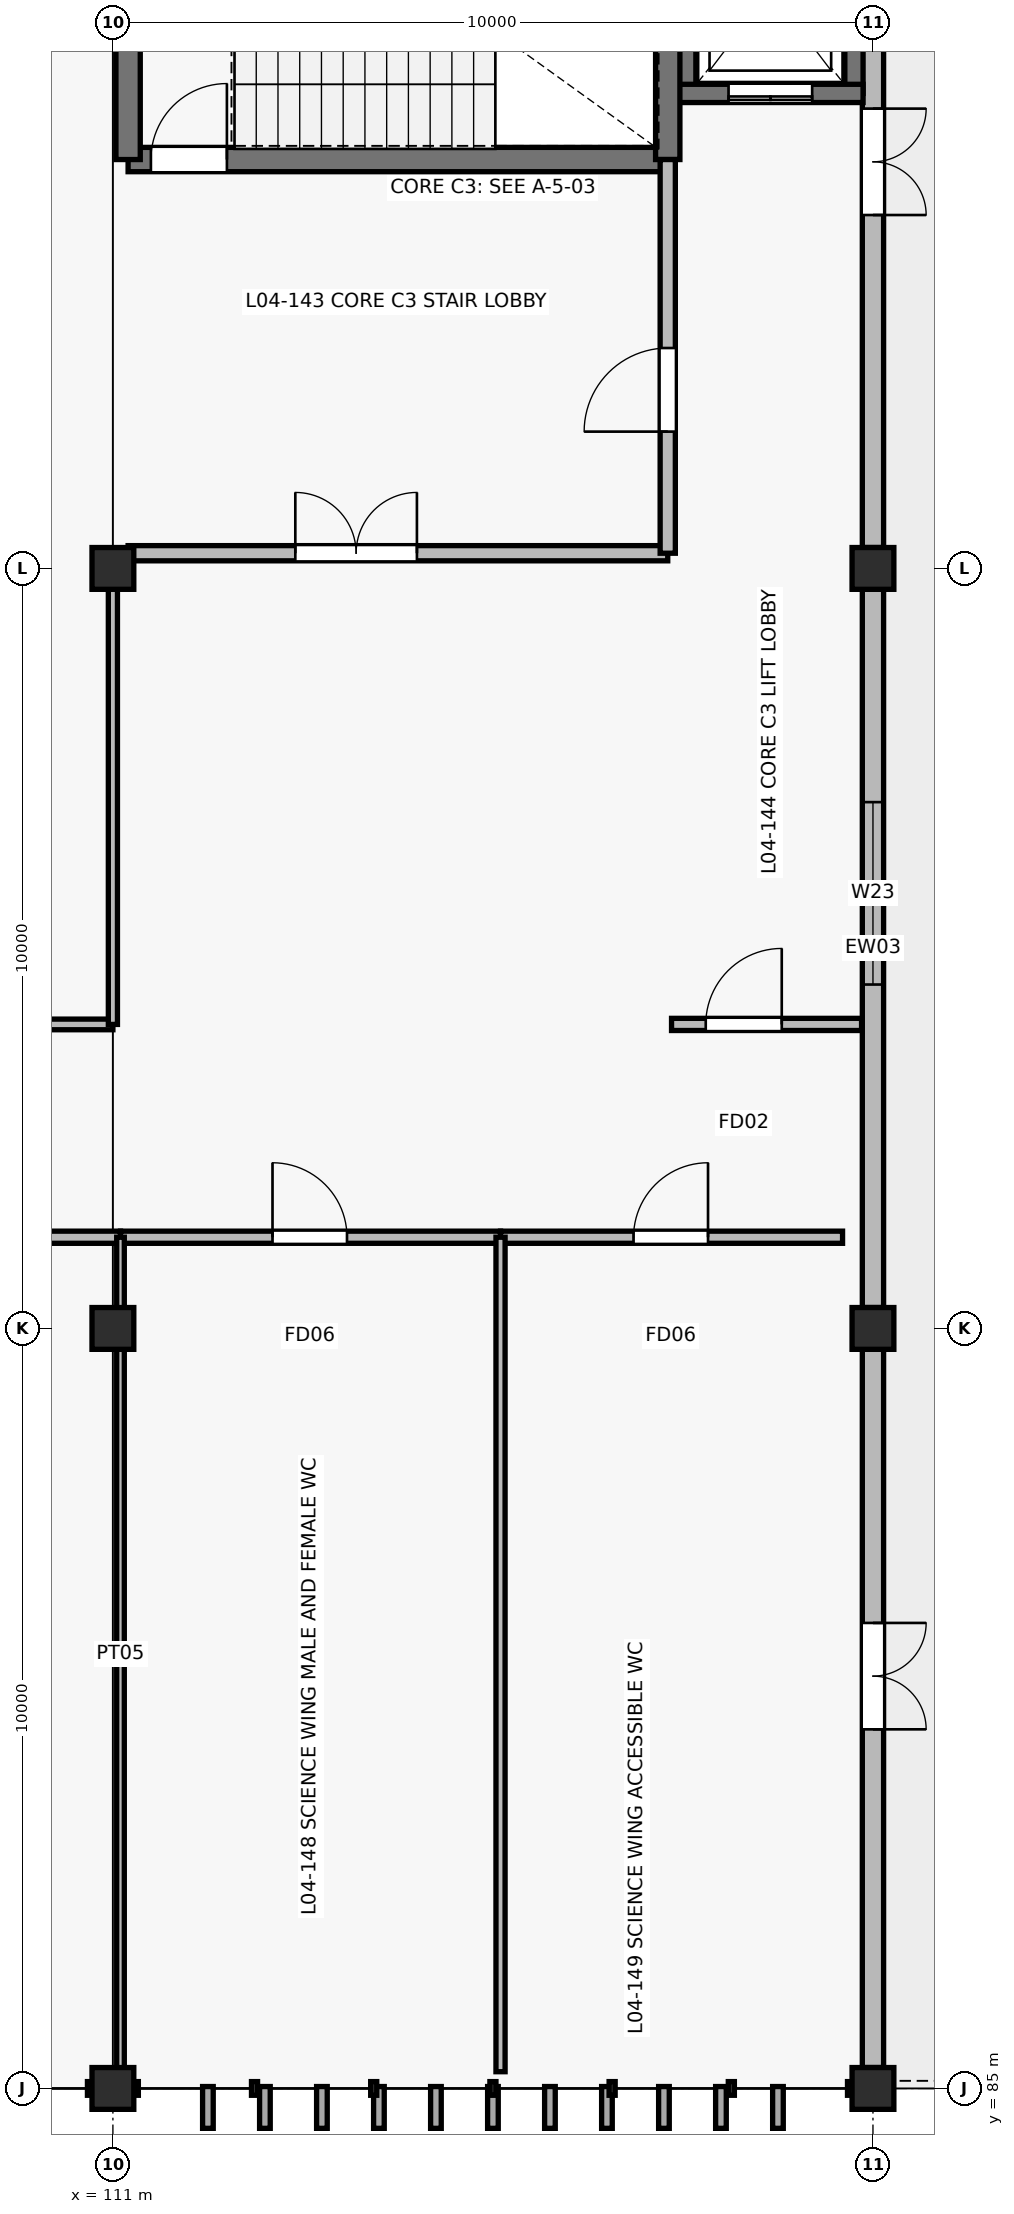
"""IFC4 building model, lengths in metres.
Left out: names, types, materials, properties, quantities, classifications, styles, units other than length and angle.
Written with IfcOpenShell. Run it as: python <this file> out.ifc"""

import sys

from ifc_helpers import new_model, si_unit, direction, frame, frame_2d, origin, origin_2d, place, context, subcontext, project, spatial, rectangle, extrude, element, fill, save


model = new_model("IFC4")
c1 = context("Model", 3, precision=1e-05, world=origin(), true_north=direction((0.0, 1.0)))
c2 = subcontext(c1, "Body", "Model", "MODEL_VIEW")
j1 = project(units=[si_unit("LENGTHUNIT", "METRE"), si_unit("PLANEANGLEUNIT", "RADIAN")], contexts=[c1])
p1 = place(None, origin())
s1 = spatial("IfcSite", under=j1, at=p1, CompositionType="ELEMENT")
p2 = place(p1, origin())
s2 = spatial("IfcBuilding", under=s1, at=p2, CompositionType="ELEMENT")
p3 = place(p2, frame((0.0, 0.0, 17.4)))
s3 = spatial("IfcBuildingStorey", under=s2, at=p3, CompositionType="ELEMENT", Elevation=17.4)
for number, where, z_axis, x_axis in (
    (1, (111.0, 85.0, 0.0), (0.0, 0.0, 1.0), (1.0, 0.0, 0.0)),
    (2, (111.0, 95.0, 0.0), (0.0, 0.0, 1.0), (1.0, 0.0, 0.0)),
    (3, (111.0, 105.0, 0.0), (0.0, 0.0, 1.0), (1.0, 0.0, 0.0)),
    (4, (121.0, 85.0, 0.0), (0.0, 0.0, 1.0), (1.0, 0.0, 0.0)),
    (5, (121.0, 95.0, 0.0), (0.0, 0.0, 1.0), (1.0, 0.0, 0.0)),
    (6, (121.0, 105.0, 0.0), (0.0, 0.0, 1.0), (1.0, 0.0, 0.0)),
):
    element("IfcColumn", number, at=place(p3, frame(where, z_axis=z_axis, x_axis=x_axis)), inside=s3, PredefinedType="COLUMN", context=c2, shape_type="SweptSolid", body=[
        extrude(rectangle(XDim=0.55, YDim=0.55, at=origin_2d()), origin(), (0.0, 0.0, 1.0), 4.2),
    ])
p4 = place(p3, frame((121.0, 94.725, 0.0), z_axis=(0.0, 0.0, 1.0), x_axis=(0.0, -1.0, 0.0)))
e7 = element("IfcWall", 7, at=p4, inside=s3, PredefinedType="SOLIDWALL", context=c2, shape_type="SweptSolid", body=[
    extrude(rectangle(XDim=9.45, YDim=0.28, at=frame_2d((4.725, 0.0))), origin(), (0.0, 0.0, 1.0), 2.975),
])
p5 = place(p4, frame((3.6, 0.0, 0.0)))
e8 = element("IfcOpeningElement", 8, at=p5, cuts=e7, PredefinedType="OPENING", context=c2, shape_type="SweptSolid", body=[
    extrude(rectangle(XDim=1.4, YDim=2.2, at=frame_2d((0.7, 1.1))), frame((0.0, 0.15, 0.0), z_axis=(0.0, -1.0, 0.0), x_axis=(1.0, 0.0, 0.0)), (0.0, 0.0, 1.0), 0.3),
])
p6 = place(p3, frame((121.0, 104.725, 0.0), z_axis=(0.0, 0.0, 1.0), x_axis=(0.0, -1.0, 0.0)))
e9 = element("IfcWall", 9, at=p6, inside=s3, PredefinedType="SOLIDWALL", context=c2, shape_type="SweptSolid", body=[
    extrude(rectangle(XDim=9.45, YDim=0.28, at=frame_2d((4.725, 0.0))), origin(), (0.0, 0.0, 1.0), 2.975),
])
p7 = place(p6, frame((2.8, 0.0, 0.9)))
e10 = element("IfcOpeningElement", 10, at=p7, cuts=e9, PredefinedType="OPENING", context=c2, shape_type="SweptSolid", body=[
    extrude(rectangle(XDim=2.4, YDim=1.1, at=frame_2d((1.2, 0.55))), frame((0.0, 0.15, 0.0), z_axis=(0.0, -1.0, 0.0), x_axis=(1.0, 0.0, 0.0)), (0.0, 0.0, 1.0), 0.3),
])
p8 = place(p3, frame((121.0, 114.65, 0.0), z_axis=(0.0, 0.0, 1.0), x_axis=(0.0, -1.0, 0.0)))
e11 = element("IfcWall", 11, at=p8, inside=s3, PredefinedType="SOLIDWALL", context=c2, shape_type="SweptSolid", body=[
    extrude(rectangle(XDim=9.375, YDim=0.28, at=frame_2d((4.688, 0.0))), origin(), (0.0, 0.0, 1.0), 2.975),
])
p9 = place(p8, frame((3.6, 0.0, 0.0)))
e12 = element("IfcOpeningElement", 12, at=p9, cuts=e11, PredefinedType="OPENING", context=c2, shape_type="SweptSolid", body=[
    extrude(rectangle(XDim=1.4, YDim=2.2, at=frame_2d((0.7, 1.1))), frame((0.0, 0.15, 0.0), z_axis=(0.0, -1.0, 0.0), x_axis=(1.0, 0.0, 0.0)), (0.0, 0.0, 1.0), 0.3),
])
for number, where, z_axis, x_axis in (
    (13, (118.55, 111.25, 0.0), (0.0, 0.0, 1.0), (0.0, 1.0, 0.0)),
    (14, (120.75, 113.95, 0.0), (0.0, 0.0, 1.0), (0.0, -1.0, 0.0)),
):
    element("IfcWall", number, at=place(p3, frame(where, z_axis=z_axis, x_axis=x_axis)), inside=s3, PredefinedType="SHEAR", context=c2, shape_type="SweptSolid", body=[
        extrude(rectangle(XDim=2.7, YDim=0.24, at=frame_2d((1.35, 0.0))), origin(), (0.0, 0.0, 1.0), 4.2),
    ])
p10 = place(p3, frame((120.87, 111.25, 0.0), z_axis=(0.0, 0.0, 1.0), x_axis=(-1.0, 0.0, 0.0)))
e15 = element("IfcWall", 15, at=p10, inside=s3, PredefinedType="SHEAR", context=c2, shape_type="SweptSolid", body=[
    extrude(rectangle(XDim=2.44, YDim=0.24, at=frame_2d((1.22, 0.0))), origin(), (0.0, 0.0, 1.0), 4.2),
])
p11 = place(p10, frame((0.67, 0.0, 0.0)))
e16 = element("IfcOpeningElement", 16, at=p11, cuts=e15, PredefinedType="OPENING", context=c2, shape_type="SweptSolid", body=[
    extrude(rectangle(XDim=1.1, YDim=2.15, at=frame_2d((0.55, 1.075))), frame((0.0, 0.13, 0.0), z_axis=(0.0, -1.0, 0.0), x_axis=(1.0, 0.0, 0.0)), (0.0, 0.0, 1.0), 0.26),
])
p12 = place(p3, frame((111.2, 110.38, 0.0), z_axis=(0.0, 0.0, 1.0), x_axis=(1.0, 0.0, 0.0)))
e17 = element("IfcWall", 17, at=p12, inside=s3, PredefinedType="SHEAR", context=c2, shape_type="SweptSolid", body=[
    extrude(rectangle(XDim=7.1, YDim=0.32, at=frame_2d((3.55, 0.0))), origin(), (0.0, 0.0, 1.0), 4.2),
])
p13 = place(p12, frame((0.3, 0.0, 0.0)))
e18 = element("IfcOpeningElement", 18, at=p13, cuts=e17, PredefinedType="OPENING", context=c2, shape_type="SweptSolid", body=[
    extrude(rectangle(XDim=1.0, YDim=2.15, at=frame_2d((0.5, 1.075))), frame((0.0, 0.17, 0.0), z_axis=(0.0, -1.0, 0.0), x_axis=(1.0, 0.0, 0.0)), (0.0, 0.0, 1.0), 0.34),
])
for number, where, z_axis, x_axis in (
    (19, (118.3, 110.38, 0.0), (0.0, 0.0, 1.0), (0.0, 1.0, 0.0)),
    (20, (111.2, 114.62, 0.0), (0.0, 0.0, 1.0), (0.0, -1.0, 0.0)),
):
    element("IfcWall", number, at=place(p3, frame(where, z_axis=z_axis, x_axis=x_axis)), inside=s3, PredefinedType="SHEAR", context=c2, shape_type="SweptSolid", body=[
        extrude(rectangle(XDim=4.24, YDim=0.32, at=frame_2d((2.12, 0.0))), origin(), (0.0, 0.0, 1.0), 4.2),
    ])
p14 = place(p3, frame((111.2, 105.2, 0.0), z_axis=(0.0, 0.0, 1.0), x_axis=(1.0, 0.0, 0.0)))
e21 = element("IfcWall", 21, at=p14, inside=s3, PredefinedType="PARTITIONING", context=c2, shape_type="SweptSolid", body=[
    extrude(rectangle(XDim=7.1, YDim=0.2, at=frame_2d((3.55, 0.0))), origin(), (0.0, 0.0, 1.0), 2.975),
])
p15 = place(p14, frame((2.2, 0.0, 0.0)))
e22 = element("IfcOpeningElement", 22, at=p15, cuts=e21, PredefinedType="OPENING", context=c2, shape_type="SweptSolid", body=[
    extrude(rectangle(XDim=1.6, YDim=2.2, at=frame_2d((0.8, 1.1))), frame((0.0, 0.11, 0.0), z_axis=(0.0, -1.0, 0.0), x_axis=(1.0, 0.0, 0.0)), (0.0, 0.0, 1.0), 0.22),
])
p16 = place(p3, frame((118.3, 105.2, 0.0), z_axis=(0.0, 0.0, 1.0), x_axis=(0.0, 1.0, 0.0)))
e23 = element("IfcWall", 23, at=p16, inside=s3, PredefinedType="PARTITIONING", context=c2, shape_type="SweptSolid", body=[
    extrude(rectangle(XDim=5.18, YDim=0.2, at=frame_2d((2.59, 0.0))), origin(), (0.0, 0.0, 1.0), 2.975),
])
p17 = place(p16, frame((1.6, 0.0, 0.0)))
e24 = element("IfcOpeningElement", 24, at=p17, cuts=e23, PredefinedType="OPENING", context=c2, shape_type="SweptSolid", body=[
    extrude(rectangle(XDim=1.1, YDim=2.15, at=frame_2d((0.55, 1.075))), frame((0.0, 0.11, 0.0), z_axis=(0.0, -1.0, 0.0), x_axis=(1.0, 0.0, 0.0)), (0.0, 0.0, 1.0), 0.22),
])
p18 = place(p3, frame((118.35, 99.0, 0.0), z_axis=(0.0, 0.0, 1.0), x_axis=(1.0, 0.0, 0.0)))
e25 = element("IfcWall", 25, at=p18, inside=s3, PredefinedType="PARTITIONING", context=c2, shape_type="SweptSolid", body=[
    extrude(rectangle(XDim=2.5, YDim=0.16, at=frame_2d((1.25, 0.0))), origin(), (0.0, 0.0, 1.0), 2.975),
])
p19 = place(p18, frame((0.45, 0.0, 0.0)))
e26 = element("IfcOpeningElement", 26, at=p19, cuts=e25, PredefinedType="OPENING", context=c2, shape_type="SweptSolid", body=[
    extrude(rectangle(XDim=1.0, YDim=2.15, at=frame_2d((0.5, 1.075))), frame((0.0, 0.09, 0.0), z_axis=(0.0, -1.0, 0.0), x_axis=(1.0, 0.0, 0.0)), (0.0, 0.0, 1.0), 0.18),
])
p20 = place(p3, frame((98.9, 96.2, 0.0), z_axis=(0.0, 0.0, 1.0), x_axis=(1.0, 0.0, 0.0)))
e27 = element("IfcWall", 27, at=p20, inside=s3, PredefinedType="PARTITIONING", context=c2, shape_type="SweptSolid", body=[
    extrude(rectangle(XDim=12.2, YDim=0.16, at=frame_2d((6.1, 0.0))), origin(), (0.0, 0.0, 1.0), 2.975),
])
p21 = place(p20, frame((5.35, 0.0, 0.0)))
e28 = element("IfcOpeningElement", 28, at=p21, cuts=e27, PredefinedType="OPENING", context=c2, shape_type="SweptSolid", body=[
    extrude(rectangle(XDim=1.5, YDim=2.2, at=frame_2d((0.75, 1.1))), frame((0.0, 0.09, 0.0), z_axis=(0.0, -1.0, 0.0), x_axis=(1.0, 0.0, 0.0)), (0.0, 0.0, 1.0), 0.18),
])
p22 = place(p3, frame((111.1, 96.2, 0.0), z_axis=(0.0, 0.0, 1.0), x_axis=(1.0, 0.0, 0.0)))
e29 = element("IfcWall", 29, at=p22, inside=s3, PredefinedType="PARTITIONING", context=c2, shape_type="SweptSolid", body=[
    extrude(rectangle(XDim=5.0, YDim=0.16, at=frame_2d((2.5, 0.0))), origin(), (0.0, 0.0, 1.0), 2.975),
])
p23 = place(p22, frame((2.0, 0.0, 0.0)))
e30 = element("IfcOpeningElement", 30, at=p23, cuts=e29, PredefinedType="OPENING", context=c2, shape_type="SweptSolid", body=[
    extrude(rectangle(XDim=0.98, YDim=2.1, at=frame_2d((0.49, 1.05))), frame((0.0, 0.09, 0.0), z_axis=(0.0, -1.0, 0.0), x_axis=(1.0, 0.0, 0.0)), (0.0, 0.0, 1.0), 0.18),
])
p24 = place(p3, frame((111.1, 85.22, 0.0), z_axis=(0.0, 0.0, 1.0), x_axis=(0.0, 1.0, 0.0)))
e31 = element("IfcWall", 31, at=p24, inside=s3, PredefinedType="PARTITIONING", context=c2, shape_type="SweptSolid", body=[
    extrude(rectangle(XDim=10.98, YDim=0.1, at=frame_2d((5.49, 0.0))), origin(), (0.0, 0.0, 1.0), 2.975),
])
p25 = place(p3, frame((116.1, 96.2, 0.0), z_axis=(0.0, 0.0, 1.0), x_axis=(1.0, 0.0, 0.0)))
e32 = element("IfcWall", 32, at=p25, inside=s3, PredefinedType="PARTITIONING", context=c2, shape_type="SweptSolid", body=[
    extrude(rectangle(XDim=4.5, YDim=0.16, at=frame_2d((2.25, 0.0))), origin(), (0.0, 0.0, 1.0), 3.325),
])
p26 = place(p25, frame((1.75, 0.0, 0.0)))
e33 = element("IfcOpeningElement", 33, at=p26, cuts=e32, PredefinedType="OPENING", context=c2, shape_type="SweptSolid", body=[
    extrude(rectangle(XDim=0.98, YDim=2.1, at=frame_2d((0.49, 1.05))), frame((0.0, 0.09, 0.0), z_axis=(0.0, -1.0, 0.0), x_axis=(1.0, 0.0, 0.0)), (0.0, 0.0, 1.0), 0.18),
])
p27 = place(p3, frame((116.1, 85.22, 0.0), z_axis=(0.0, 0.0, 1.0), x_axis=(0.0, 1.0, 0.0)))
e34 = element("IfcWall", 34, at=p27, inside=s3, PredefinedType="PARTITIONING", context=c2, shape_type="SweptSolid", body=[
    extrude(rectangle(XDim=10.98, YDim=0.12, at=frame_2d((5.49, 0.0))), origin(), (0.0, 0.0, 1.0), 2.975),
])
p28 = place(p3, frame((101.0, 99.0, 0.0), z_axis=(0.0, 0.0, 1.0), x_axis=(1.0, 0.0, 0.0)))
e35 = element("IfcWall", 35, at=p28, inside=s3, PredefinedType="PARTITIONING", context=c2, shape_type="SweptSolid", body=[
    extrude(rectangle(XDim=10.0, YDim=0.14, at=frame_2d((5.0, 0.0))), origin(), (0.0, 0.0, 1.0), 2.975),
])
p29 = place(p28, frame((4.1, 0.0, 0.0)))
e36 = element("IfcOpeningElement", 36, at=p29, cuts=e35, PredefinedType="OPENING", context=c2, shape_type="SweptSolid", body=[
    extrude(rectangle(XDim=1.8, YDim=2.25, at=frame_2d((0.9, 1.125))), frame((0.0, 0.08, 0.0), z_axis=(0.0, -1.0, 0.0), x_axis=(1.0, 0.0, 0.0)), (0.0, 0.0, 1.0), 0.16),
])
p30 = place(p3, frame((111.0, 99.0, 0.0), z_axis=(0.0, 0.0, 1.0), x_axis=(0.0, 1.0, 0.0)))
e37 = element("IfcWall", 37, at=p30, inside=s3, PredefinedType="PARTITIONING", context=c2, shape_type="SweptSolid", body=[
    extrude(rectangle(XDim=6.2, YDim=0.12, at=frame_2d((3.1, 0.0))), origin(), (0.0, 0.0, 1.0), 2.975),
])
p31 = place(p5, origin())
e38 = element("IfcDoor", 38, at=p31, inside=s3, OperationType="DOUBLE_DOOR_SINGLE_SWING", PredefinedType="DOOR", context=c2, shape_type="SweptSolid", body=[
    extrude(rectangle(XDim=1.4, YDim=2.2, at=frame_2d((0.7, 1.1))), frame((0.0, 0.025, 0.0), z_axis=(0.0, -1.0, 0.0), x_axis=(1.0, 0.0, 0.0)), (0.0, 0.0, 1.0), 0.05),
])
fill(e8, e38)
p32 = place(p7, origin())
e39 = element("IfcWindow", 39, at=p32, inside=s3, PartitioningType="DOUBLE_PANEL_VERTICAL", PredefinedType="WINDOW", context=c2, shape_type="SweptSolid", body=[
    extrude(rectangle(XDim=2.4, YDim=1.1, at=frame_2d((1.2, 0.55))), frame((0.0, 0.03, 0.0), z_axis=(0.0, -1.0, 0.0), x_axis=(1.0, 0.0, 0.0)), (0.0, 0.0, 1.0), 0.06),
])
fill(e10, e39)
p33 = place(p9, origin())
e40 = element("IfcDoor", 40, at=p33, inside=s3, OperationType="DOUBLE_DOOR_SINGLE_SWING", PredefinedType="DOOR", context=c2, shape_type="SweptSolid", body=[
    extrude(rectangle(XDim=1.4, YDim=2.2, at=frame_2d((0.7, 1.1))), frame((0.0, 0.025, 0.0), z_axis=(0.0, -1.0, 0.0), x_axis=(1.0, 0.0, 0.0)), (0.0, 0.0, 1.0), 0.05),
])
fill(e12, e40)
p34 = place(p11, origin())
e41 = element("IfcDoor", 41, at=p34, inside=s3, OperationType="DOUBLE_DOOR_SLIDING", PredefinedType="USERDEFINED", context=c2, shape_type="SweptSolid", body=[
    extrude(rectangle(XDim=1.1, YDim=2.15, at=frame_2d((0.55, 1.075))), frame((0.0, 0.025, 0.0), z_axis=(0.0, -1.0, 0.0), x_axis=(1.0, 0.0, 0.0)), (0.0, 0.0, 1.0), 0.05),
])
fill(e16, e41)
p35 = place(p13, origin())
e42 = element("IfcDoor", 42, at=p35, inside=s3, OperationType="SINGLE_SWING_RIGHT", PredefinedType="DOOR", context=c2, shape_type="SweptSolid", body=[
    extrude(rectangle(XDim=1.0, YDim=2.15, at=frame_2d((0.5, 1.075))), frame((0.0, 0.025, 0.0), z_axis=(0.0, -1.0, 0.0), x_axis=(1.0, 0.0, 0.0)), (0.0, 0.0, 1.0), 0.05),
])
fill(e18, e42)
p36 = place(p15, origin())
e43 = element("IfcDoor", 43, at=p36, inside=s3, OperationType="DOUBLE_DOOR_SINGLE_SWING", PredefinedType="DOOR", context=c2, shape_type="SweptSolid", body=[
    extrude(rectangle(XDim=1.6, YDim=2.2, at=frame_2d((0.8, 1.1))), frame((0.0, 0.025, 0.0), z_axis=(0.0, -1.0, 0.0), x_axis=(1.0, 0.0, 0.0)), (0.0, 0.0, 1.0), 0.05),
])
fill(e22, e43)
p37 = place(p17, origin())
e44 = element("IfcDoor", 44, at=p37, inside=s3, OperationType="SINGLE_SWING_LEFT", PredefinedType="DOOR", context=c2, shape_type="SweptSolid", body=[
    extrude(rectangle(XDim=1.1, YDim=2.15, at=frame_2d((0.55, 1.075))), frame((0.0, 0.025, 0.0), z_axis=(0.0, -1.0, 0.0), x_axis=(1.0, 0.0, 0.0)), (0.0, 0.0, 1.0), 0.05),
])
fill(e24, e44)
p38 = place(p19, origin())
e45 = element("IfcDoor", 45, at=p38, inside=s3, OperationType="SINGLE_SWING_RIGHT", PredefinedType="DOOR", context=c2, shape_type="SweptSolid", body=[
    extrude(rectangle(XDim=1.0, YDim=2.15, at=frame_2d((0.5, 1.075))), frame((0.0, 0.025, 0.0), z_axis=(0.0, -1.0, 0.0), x_axis=(1.0, 0.0, 0.0)), (0.0, 0.0, 1.0), 0.05),
])
fill(e26, e45)
p39 = place(p23, origin())
e46 = element("IfcDoor", 46, at=p39, inside=s3, OperationType="SINGLE_SWING_LEFT", PredefinedType="DOOR", context=c2, shape_type="SweptSolid", body=[
    extrude(rectangle(XDim=0.98, YDim=2.1, at=frame_2d((0.49, 1.05))), frame((0.0, 0.025, 0.0), z_axis=(0.0, -1.0, 0.0), x_axis=(1.0, 0.0, 0.0)), (0.0, 0.0, 1.0), 0.05),
])
fill(e30, e46)
p40 = place(p26, origin())
e47 = element("IfcDoor", 47, at=p40, inside=s3, OperationType="SINGLE_SWING_RIGHT", PredefinedType="DOOR", context=c2, shape_type="SweptSolid", body=[
    extrude(rectangle(XDim=0.98, YDim=2.1, at=frame_2d((0.49, 1.05))), frame((0.0, 0.025, 0.0), z_axis=(0.0, -1.0, 0.0), x_axis=(1.0, 0.0, 0.0)), (0.0, 0.0, 1.0), 0.05),
])
fill(e33, e47)
save(model, sys.argv[1])
